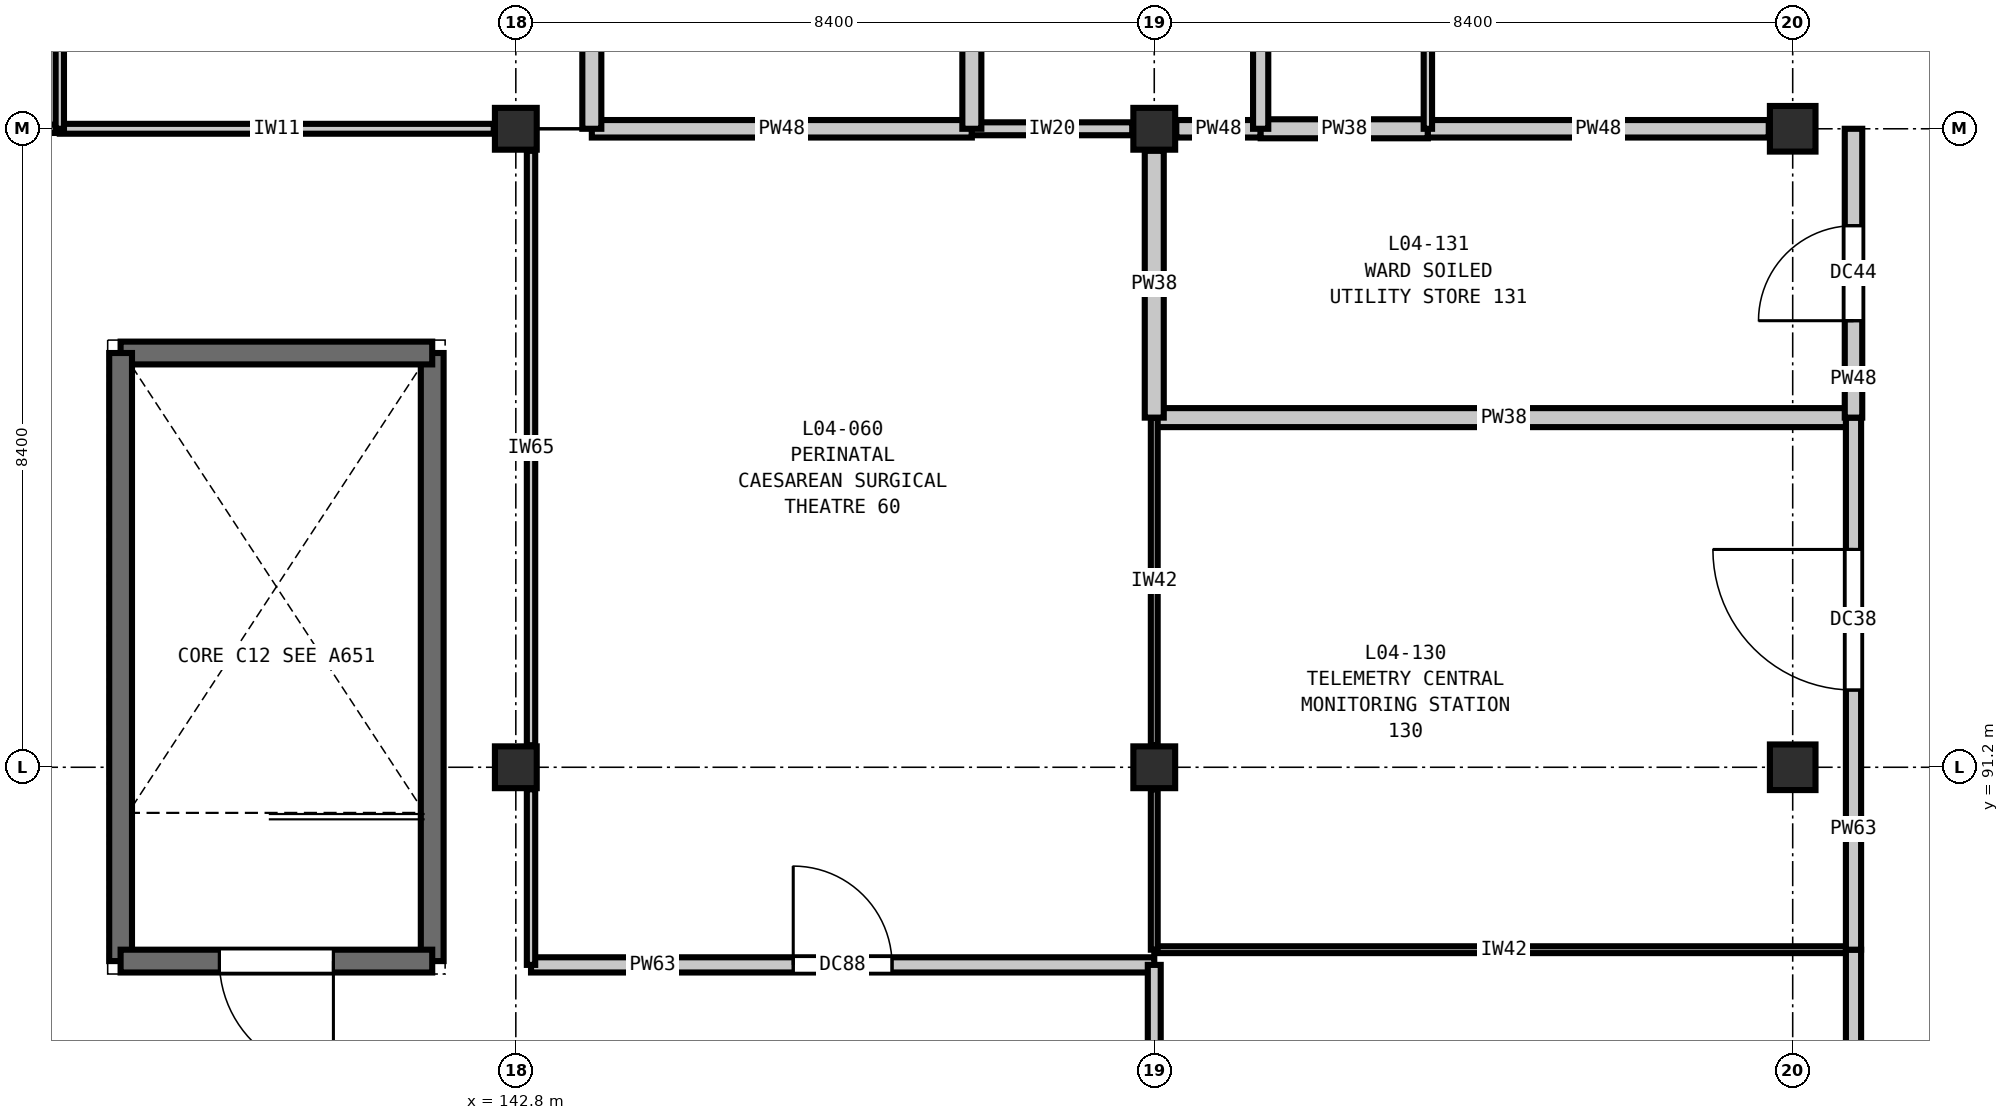
"""IFC4 building model, lengths in metres.
Left out: names, types, materials, properties, quantities, classifications, styles, units other than length and angle.
Written with IfcOpenShell. Run it as: python <this file> out.ifc"""

import sys

from ifc_helpers import new_model, si_unit, direction, frame, frame_2d, origin, origin_2d, place, context, subcontext, project, spatial, rectangle, extrude, element, fill, save


model = new_model("IFC4")
c1 = context("Model", 3, precision=1e-05, world=origin(), true_north=direction((0.0, 1.0)))
c2 = subcontext(c1, "Body", "Model", "MODEL_VIEW")
j1 = project(units=[si_unit("LENGTHUNIT", "METRE"), si_unit("PLANEANGLEUNIT", "RADIAN")], contexts=[c1])
p1 = place(None, origin())
s1 = spatial("IfcSite", under=j1, at=p1, CompositionType="ELEMENT")
p2 = place(p1, origin())
s2 = spatial("IfcBuilding", under=s1, at=p2, CompositionType="ELEMENT")
p3 = place(p2, frame((0.0, 0.0, 20.4)))
s3 = spatial("IfcBuildingStorey", under=s2, at=p3, CompositionType="ELEMENT", Elevation=20.4)
for number, where, z_axis, x_axis in (
    (1, (142.8, 91.2, 0.0), (0.0, 0.0, 1.0), (1.0, 0.0, 0.0)),
    (2, (142.8, 99.6, 0.0), (0.0, 0.0, 1.0), (1.0, 0.0, 0.0)),
    (3, (151.2, 91.2, 0.0), (0.0, 0.0, 1.0), (1.0, 0.0, 0.0)),
    (4, (151.2, 99.6, 0.0), (0.0, 0.0, 1.0), (1.0, 0.0, 0.0)),
):
    element("IfcColumn", number, at=place(p3, frame(where, z_axis=z_axis, x_axis=x_axis)), inside=s3, PredefinedType="COLUMN", context=c2, shape_type="SweptSolid", body=[
        extrude(rectangle(XDim=0.55, YDim=0.55, at=origin_2d()), origin(), (0.0, 0.0, 1.0), 4.2),
    ])
for number, where, z_axis, x_axis in (
    (5, (159.6, 91.2, 0.0), (0.0, 0.0, 1.0), (1.0, 0.0, 0.0)),
    (6, (159.6, 99.6, 0.0), (0.0, 0.0, 1.0), (1.0, 0.0, 0.0)),
):
    element("IfcColumn", number, at=place(p3, frame(where, z_axis=z_axis, x_axis=x_axis)), inside=s3, PredefinedType="COLUMN", context=c2, shape_type="SweptSolid", body=[
        extrude(rectangle(XDim=0.6, YDim=0.6, at=origin_2d()), origin(), (0.0, 0.0, 1.0), 4.2),
    ])
p4 = place(p3, frame((141.7, 88.65, 0.0), z_axis=(0.0, 0.0, 1.0), x_axis=(0.0, 1.0, 0.0)))
e7 = element("IfcWall", 7, at=p4, inside=s3, PredefinedType="SHEAR", context=c2, shape_type="SweptSolid", body=[
    extrude(rectangle(XDim=8.0, YDim=0.3, at=frame_2d((4.0, 0.0))), origin(), (0.0, 0.0, 1.0), 4.2),
])
p5 = place(p3, frame((141.7, 96.65, 0.0), z_axis=(0.0, 0.0, 1.0), x_axis=(-1.0, 0.0, 0.0)))
e8 = element("IfcWall", 8, at=p5, inside=s3, PredefinedType="SHEAR", context=c2, shape_type="SweptSolid", body=[
    extrude(rectangle(XDim=4.1, YDim=0.3, at=frame_2d((2.05, 0.0))), origin(), (0.0, 0.0, 1.0), 4.2),
])
p6 = place(p3, frame((137.6, 96.65, 0.0), z_axis=(0.0, 0.0, 1.0), x_axis=(0.0, -1.0, 0.0)))
e9 = element("IfcWall", 9, at=p6, inside=s3, PredefinedType="SHEAR", context=c2, shape_type="SweptSolid", body=[
    extrude(rectangle(XDim=8.0, YDim=0.3, at=frame_2d((4.0, 0.0))), origin(), (0.0, 0.0, 1.0), 4.2),
])
p7 = place(p3, frame((137.6, 88.65, 0.0), z_axis=(0.0, 0.0, 1.0), x_axis=(1.0, 0.0, 0.0)))
e10 = element("IfcWall", 10, at=p7, inside=s3, PredefinedType="SHEAR", context=c2, shape_type="SweptSolid", body=[
    extrude(rectangle(XDim=4.1, YDim=0.3, at=frame_2d((2.05, 0.0))), origin(), (0.0, 0.0, 1.0), 4.2),
])
p8 = place(p7, frame((1.3, 0.0, 0.0)))
e11 = element("IfcOpeningElement", 11, at=p8, cuts=e10, PredefinedType="OPENING", context=c2, shape_type="SweptSolid", body=[
    extrude(rectangle(XDim=1.5, YDim=2.2, at=frame_2d((0.75, 1.1))), frame((0.0, 0.16, 0.0), z_axis=(0.0, -1.0, 0.0), x_axis=(1.0, 0.0, 0.0)), (0.0, 0.0, 1.0), 0.32),
])
p9 = place(p3, frame((143.0, 88.6, 0.0), z_axis=(0.0, 0.0, 1.0), x_axis=(1.0, 0.0, 0.0)))
e12 = element("IfcWall", 12, at=p9, inside=s3, PredefinedType="PARTITIONING", context=c2, shape_type="SweptSolid", body=[
    extrude(rectangle(XDim=8.2, YDim=0.2, at=frame_2d((4.1, 0.0))), origin(), (0.0, 0.0, 1.0), 3.82),
])
p10 = place(p9, frame((3.45, 0.0, 0.0)))
e13 = element("IfcOpeningElement", 13, at=p10, cuts=e12, PredefinedType="OPENING", context=c2, shape_type="SweptSolid", body=[
    extrude(rectangle(XDim=1.3, YDim=2.2, at=frame_2d((0.65, 1.1))), frame((0.0, 0.11, 0.0), z_axis=(0.0, -1.0, 0.0), x_axis=(1.0, 0.0, 0.0)), (0.0, 0.0, 1.0), 0.22),
])
p11 = place(p3, frame((151.2, 88.8, 0.0), z_axis=(0.0, 0.0, 1.0), x_axis=(1.0, 0.0, 0.0)))
e14 = element("IfcWall", 14, at=p11, inside=s3, PredefinedType="PARTITIONING", context=c2, shape_type="SweptSolid", body=[
    extrude(rectangle(XDim=9.2, YDim=0.09, at=frame_2d((4.6, 0.0))), origin(), (0.0, 0.0, 1.0), 3.82),
])
p12 = place(p3, frame((151.2, 95.8, 0.0), z_axis=(0.0, 0.0, 1.0), x_axis=(1.0, 0.0, 0.0)))
e15 = element("IfcWall", 15, at=p12, inside=s3, PredefinedType="PARTITIONING", context=c2, shape_type="SweptSolid", body=[
    extrude(rectangle(XDim=9.2, YDim=0.25, at=frame_2d((4.6, 0.0))), origin(), (0.0, 0.0, 1.0), 3.82),
])
p13 = place(p3, frame((134.69, 99.6, 0.0), z_axis=(0.0, 0.0, 1.0), x_axis=(1.0, 0.0, 0.0)))
e16 = element("IfcWall", 16, at=p13, inside=s3, PredefinedType="PARTITIONING", context=c2, shape_type="SweptSolid", body=[
    extrude(rectangle(XDim=2.11, YDim=0.11, at=frame_2d((1.055, 0.0))), origin(), (0.0, 0.0, 1.0), 3.585),
])
p14 = place(p3, frame((136.8, 99.6, 0.0), z_axis=(0.0, 0.0, 1.0), x_axis=(1.0, 0.0, 0.0)))
e17 = element("IfcWall", 17, at=p14, inside=s3, PredefinedType="PARTITIONING", context=c2, shape_type="SweptSolid", body=[
    extrude(rectangle(XDim=5.71, YDim=0.13, at=frame_2d((2.855, 0.0))), origin(), (0.0, 0.0, 1.0), 3.585),
])
p15 = place(p3, frame((143.8, 99.6, 0.0), z_axis=(0.0, 0.0, 1.0), x_axis=(1.0, 0.0, 0.0)))
e18 = element("IfcWall", 18, at=p15, inside=s3, PredefinedType="PARTITIONING", context=c2, shape_type="SweptSolid", body=[
    extrude(rectangle(XDim=5.0, YDim=0.23, at=frame_2d((2.5, 0.0))), origin(), (0.0, 0.0, 1.0), 3.585),
])
p16 = place(p3, frame((148.8, 99.6, 0.0), z_axis=(0.0, 0.0, 1.0), x_axis=(1.0, 0.0, 0.0)))
e19 = element("IfcWall", 19, at=p16, inside=s3, PredefinedType="PARTITIONING", context=c2, shape_type="SweptSolid", body=[
    extrude(rectangle(XDim=2.11, YDim=0.17, at=frame_2d((1.055, 0.0))), origin(), (0.0, 0.0, 1.0), 3.585),
])
p17 = place(p3, frame((151.49, 99.6, 0.0), z_axis=(0.0, 0.0, 1.0), x_axis=(1.0, 0.0, 0.0)))
e20 = element("IfcWall", 20, at=p17, inside=s3, PredefinedType="PARTITIONING", context=c2, shape_type="SweptSolid", body=[
    extrude(rectangle(XDim=1.11, YDim=0.23, at=frame_2d((0.555, 0.0))), origin(), (0.0, 0.0, 1.0), 3.585),
])
p18 = place(p3, frame((152.6, 99.6, 0.0), z_axis=(0.0, 0.0, 1.0), x_axis=(1.0, 0.0, 0.0)))
e21 = element("IfcWall", 21, at=p18, inside=s3, PredefinedType="PARTITIONING", context=c2, shape_type="SweptSolid", body=[
    extrude(rectangle(XDim=2.2, YDim=0.25, at=frame_2d((1.1, 0.0))), origin(), (0.0, 0.0, 1.0), 3.585),
])
p19 = place(p3, frame((154.8, 99.6, 0.0), z_axis=(0.0, 0.0, 1.0), x_axis=(1.0, 0.0, 0.0)))
e22 = element("IfcWall", 22, at=p19, inside=s3, PredefinedType="PARTITIONING", context=c2, shape_type="SweptSolid", body=[
    extrude(rectangle(XDim=4.485, YDim=0.23, at=frame_2d((2.242, 0.0))), origin(), (0.0, 0.0, 1.0), 3.585),
])
p20 = place(p3, frame((136.8, 99.6, 0.0), z_axis=(0.0, 0.0, 1.0), x_axis=(0.0, 1.0, 0.0)))
e23 = element("IfcWall", 23, at=p20, inside=s3, PredefinedType="PARTITIONING", context=c2, shape_type="SweptSolid", body=[
    extrude(rectangle(XDim=6.8, YDim=0.11, at=frame_2d((3.4, 0.0))), origin(), (0.0, 0.0, 1.0), 3.82),
])
p21 = place(p3, frame((143.0, 91.49, 0.0), z_axis=(0.0, 0.0, 1.0), x_axis=(0.0, 1.0, 0.0)))
e24 = element("IfcWall", 24, at=p21, inside=s3, PredefinedType="PARTITIONING", context=c2, shape_type="SweptSolid", body=[
    extrude(rectangle(XDim=7.82, YDim=0.11, at=frame_2d((3.91, 0.0))), origin(), (0.0, 0.0, 1.0), 3.585),
])
p22 = place(p3, frame((143.0, 88.6, 0.0), z_axis=(0.0, 0.0, 1.0), x_axis=(0.0, 1.0, 0.0)))
e25 = element("IfcWall", 25, at=p22, inside=s3, PredefinedType="PARTITIONING", context=c2, shape_type="SweptSolid", body=[
    extrude(rectangle(XDim=2.31, YDim=0.11, at=frame_2d((1.155, 0.0))), origin(), (0.0, 0.0, 1.0), 3.585),
])
for number, where, z_axis, x_axis in (
    (26, (143.8, 99.6, 0.0), (0.0, 0.0, 1.0), (0.0, 1.0, 0.0)),
    (27, (148.8, 99.6, 0.0), (0.0, 0.0, 1.0), (0.0, 1.0, 0.0)),
):
    element("IfcWall", number, at=place(p3, frame(where, z_axis=z_axis, x_axis=x_axis)), inside=s3, PredefinedType="PARTITIONING", context=c2, shape_type="SweptSolid", body=[
        extrude(rectangle(XDim=13.6, YDim=0.25, at=frame_2d((6.8, 0.0))), origin(), (0.0, 0.0, 1.0), 3.82),
    ])
p23 = place(p3, frame((151.2, 85.8, 0.0), z_axis=(0.0, 0.0, 1.0), x_axis=(0.0, 1.0, 0.0)))
e28 = element("IfcWall", 28, at=p23, inside=s3, PredefinedType="PARTITIONING", context=c2, shape_type="SweptSolid", body=[
    extrude(rectangle(XDim=2.8, YDim=0.17, at=frame_2d((1.4, 0.0))), origin(), (0.0, 0.0, 1.0), 3.585),
])
p24 = place(p3, frame((151.2, 91.49, 0.0), z_axis=(0.0, 0.0, 1.0), x_axis=(0.0, 1.0, 0.0)))
e29 = element("IfcWall", 29, at=p24, inside=s3, PredefinedType="PARTITIONING", context=c2, shape_type="SweptSolid", body=[
    extrude(rectangle(XDim=4.31, YDim=0.09, at=frame_2d((2.155, 0.0))), origin(), (0.0, 0.0, 1.0), 3.585),
])
p25 = place(p3, frame((151.2, 88.8, 0.0), z_axis=(0.0, 0.0, 1.0), x_axis=(0.0, 1.0, 0.0)))
e30 = element("IfcWall", 30, at=p25, inside=s3, PredefinedType="PARTITIONING", context=c2, shape_type="SweptSolid", body=[
    extrude(rectangle(XDim=2.11, YDim=0.09, at=frame_2d((1.055, 0.0))), origin(), (0.0, 0.0, 1.0), 3.585),
])
p26 = place(p3, frame((151.2, 95.8, 0.0), z_axis=(0.0, 0.0, 1.0), x_axis=(0.0, 1.0, 0.0)))
e31 = element("IfcWall", 31, at=p26, inside=s3, PredefinedType="PARTITIONING", context=c2, shape_type="SweptSolid", body=[
    extrude(rectangle(XDim=3.51, YDim=0.25, at=frame_2d((1.755, 0.0))), origin(), (0.0, 0.0, 1.0), 3.585),
])
p27 = place(p3, frame((152.6, 99.6, 0.0), z_axis=(0.0, 0.0, 1.0), x_axis=(0.0, 1.0, 0.0)))
e32 = element("IfcWall", 32, at=p27, inside=s3, PredefinedType="PARTITIONING", context=c2, shape_type="SweptSolid", body=[
    extrude(rectangle(XDim=6.8, YDim=0.2, at=frame_2d((3.4, 0.0))), origin(), (0.0, 0.0, 1.0), 3.82),
])
p28 = place(p27, frame((4.056, 0.0, 0.0)))
e33 = element("IfcOpeningElement", 33, at=p28, cuts=e32, PredefinedType="OPENING", context=c2, shape_type="SweptSolid", body=[
    extrude(rectangle(XDim=1.55, YDim=2.25, at=frame_2d((0.775, 1.125))), frame((0.0, 0.11, 0.0), z_axis=(0.0, -1.0, 0.0), x_axis=(1.0, 0.0, 0.0)), (0.0, 0.0, 1.0), 0.22),
])
p29 = place(p3, frame((154.8, 99.6, 0.0), z_axis=(0.0, 0.0, 1.0), x_axis=(0.0, 1.0, 0.0)))
e34 = element("IfcWall", 34, at=p29, inside=s3, PredefinedType="PARTITIONING", context=c2, shape_type="SweptSolid", body=[
    extrude(rectangle(XDim=6.8, YDim=0.11, at=frame_2d((3.4, 0.0))), origin(), (0.0, 0.0, 1.0), 3.82),
])
p30 = place(p3, frame((160.4, 82.8, 0.0), z_axis=(0.0, 0.0, 1.0), x_axis=(0.0, 1.0, 0.0)))
e35 = element("IfcWall", 35, at=p30, inside=s3, PredefinedType="PARTITIONING", context=c2, shape_type="SweptSolid", body=[
    extrude(rectangle(XDim=6.0, YDim=0.2, at=frame_2d((3.0, 0.0))), origin(), (0.0, 0.0, 1.0), 3.82),
])
p31 = place(p30, frame((2.15, 0.0, 0.0)))
e36 = element("IfcOpeningElement", 36, at=p31, cuts=e35, PredefinedType="OPENING", context=c2, shape_type="SweptSolid", body=[
    extrude(rectangle(XDim=1.7, YDim=2.3, at=frame_2d((0.85, 1.15))), frame((0.0, 0.11, 0.0), z_axis=(0.0, -1.0, 0.0), x_axis=(1.0, 0.0, 0.0)), (0.0, 0.0, 1.0), 0.22),
])
p32 = place(p3, frame((160.4, 88.8, 0.0), z_axis=(0.0, 0.0, 1.0), x_axis=(0.0, 1.0, 0.0)))
e37 = element("IfcWall", 37, at=p32, inside=s3, PredefinedType="PARTITIONING", context=c2, shape_type="SweptSolid", body=[
    extrude(rectangle(XDim=7.0, YDim=0.2, at=frame_2d((3.5, 0.0))), origin(), (0.0, 0.0, 1.0), 3.82),
])
p33 = place(p32, frame((3.416, 0.0, 0.0)))
e38 = element("IfcOpeningElement", 38, at=p33, cuts=e37, PredefinedType="OPENING", context=c2, shape_type="SweptSolid", body=[
    extrude(rectangle(XDim=1.85, YDim=2.3, at=frame_2d((0.925, 1.15))), frame((0.0, 0.11, 0.0), z_axis=(0.0, -1.0, 0.0), x_axis=(1.0, 0.0, 0.0)), (0.0, 0.0, 1.0), 0.22),
])
p34 = place(p3, frame((160.4, 95.8, 0.0), z_axis=(0.0, 0.0, 1.0), x_axis=(0.0, 1.0, 0.0)))
e39 = element("IfcWall", 39, at=p34, inside=s3, PredefinedType="PARTITIONING", context=c2, shape_type="SweptSolid", body=[
    extrude(rectangle(XDim=3.8, YDim=0.23, at=frame_2d((1.9, 0.0))), origin(), (0.0, 0.0, 1.0), 3.82),
])
p35 = place(p34, frame((1.275, 0.0, 0.0)))
e40 = element("IfcOpeningElement", 40, at=p35, cuts=e39, PredefinedType="OPENING", context=c2, shape_type="SweptSolid", body=[
    extrude(rectangle(XDim=1.25, YDim=2.15, at=frame_2d((0.625, 1.075))), frame((0.0, 0.125, 0.0), z_axis=(0.0, -1.0, 0.0), x_axis=(1.0, 0.0, 0.0)), (0.0, 0.0, 1.0), 0.25),
])
p36 = place(p8, frame((1.5, 0.0, 0.0), z_axis=(0.0, 0.0, 1.0), x_axis=(-1.0, 0.0, 0.0)))
e41 = element("IfcDoor", 41, at=p36, inside=s3, OperationType="SINGLE_SWING_LEFT", PredefinedType="DOOR", context=c2, shape_type="SweptSolid", body=[
    extrude(rectangle(XDim=1.5, YDim=2.2, at=frame_2d((0.75, 1.1))), frame((0.0, 0.025, 0.0), z_axis=(0.0, -1.0, 0.0), x_axis=(1.0, 0.0, 0.0)), (0.0, 0.0, 1.0), 0.05),
])
fill(e11, e41)
p37 = place(p10, origin())
e42 = element("IfcDoor", 42, at=p37, inside=s3, OperationType="SINGLE_SWING_LEFT", PredefinedType="DOOR", context=c2, shape_type="SweptSolid", body=[
    extrude(rectangle(XDim=1.3, YDim=2.2, at=frame_2d((0.65, 1.1))), frame((0.0, 0.025, 0.0), z_axis=(0.0, -1.0, 0.0), x_axis=(1.0, 0.0, 0.0)), (0.0, 0.0, 1.0), 0.05),
])
fill(e13, e42)
p38 = place(p33, origin())
e43 = element("IfcDoor", 43, at=p38, inside=s3, OperationType="SINGLE_SWING_RIGHT", PredefinedType="DOOR", context=c2, shape_type="SweptSolid", body=[
    extrude(rectangle(XDim=1.85, YDim=2.3, at=frame_2d((0.925, 1.15))), frame((0.0, 0.025, 0.0), z_axis=(0.0, -1.0, 0.0), x_axis=(1.0, 0.0, 0.0)), (0.0, 0.0, 1.0), 0.05),
])
fill(e38, e43)
p39 = place(p35, origin())
e44 = element("IfcDoor", 44, at=p39, inside=s3, OperationType="SINGLE_SWING_LEFT", PredefinedType="DOOR", context=c2, shape_type="SweptSolid", body=[
    extrude(rectangle(XDim=1.25, YDim=2.15, at=frame_2d((0.625, 1.075))), frame((0.0, 0.025, 0.0), z_axis=(0.0, -1.0, 0.0), x_axis=(1.0, 0.0, 0.0)), (0.0, 0.0, 1.0), 0.05),
])
fill(e40, e44)
save(model, sys.argv[1])
